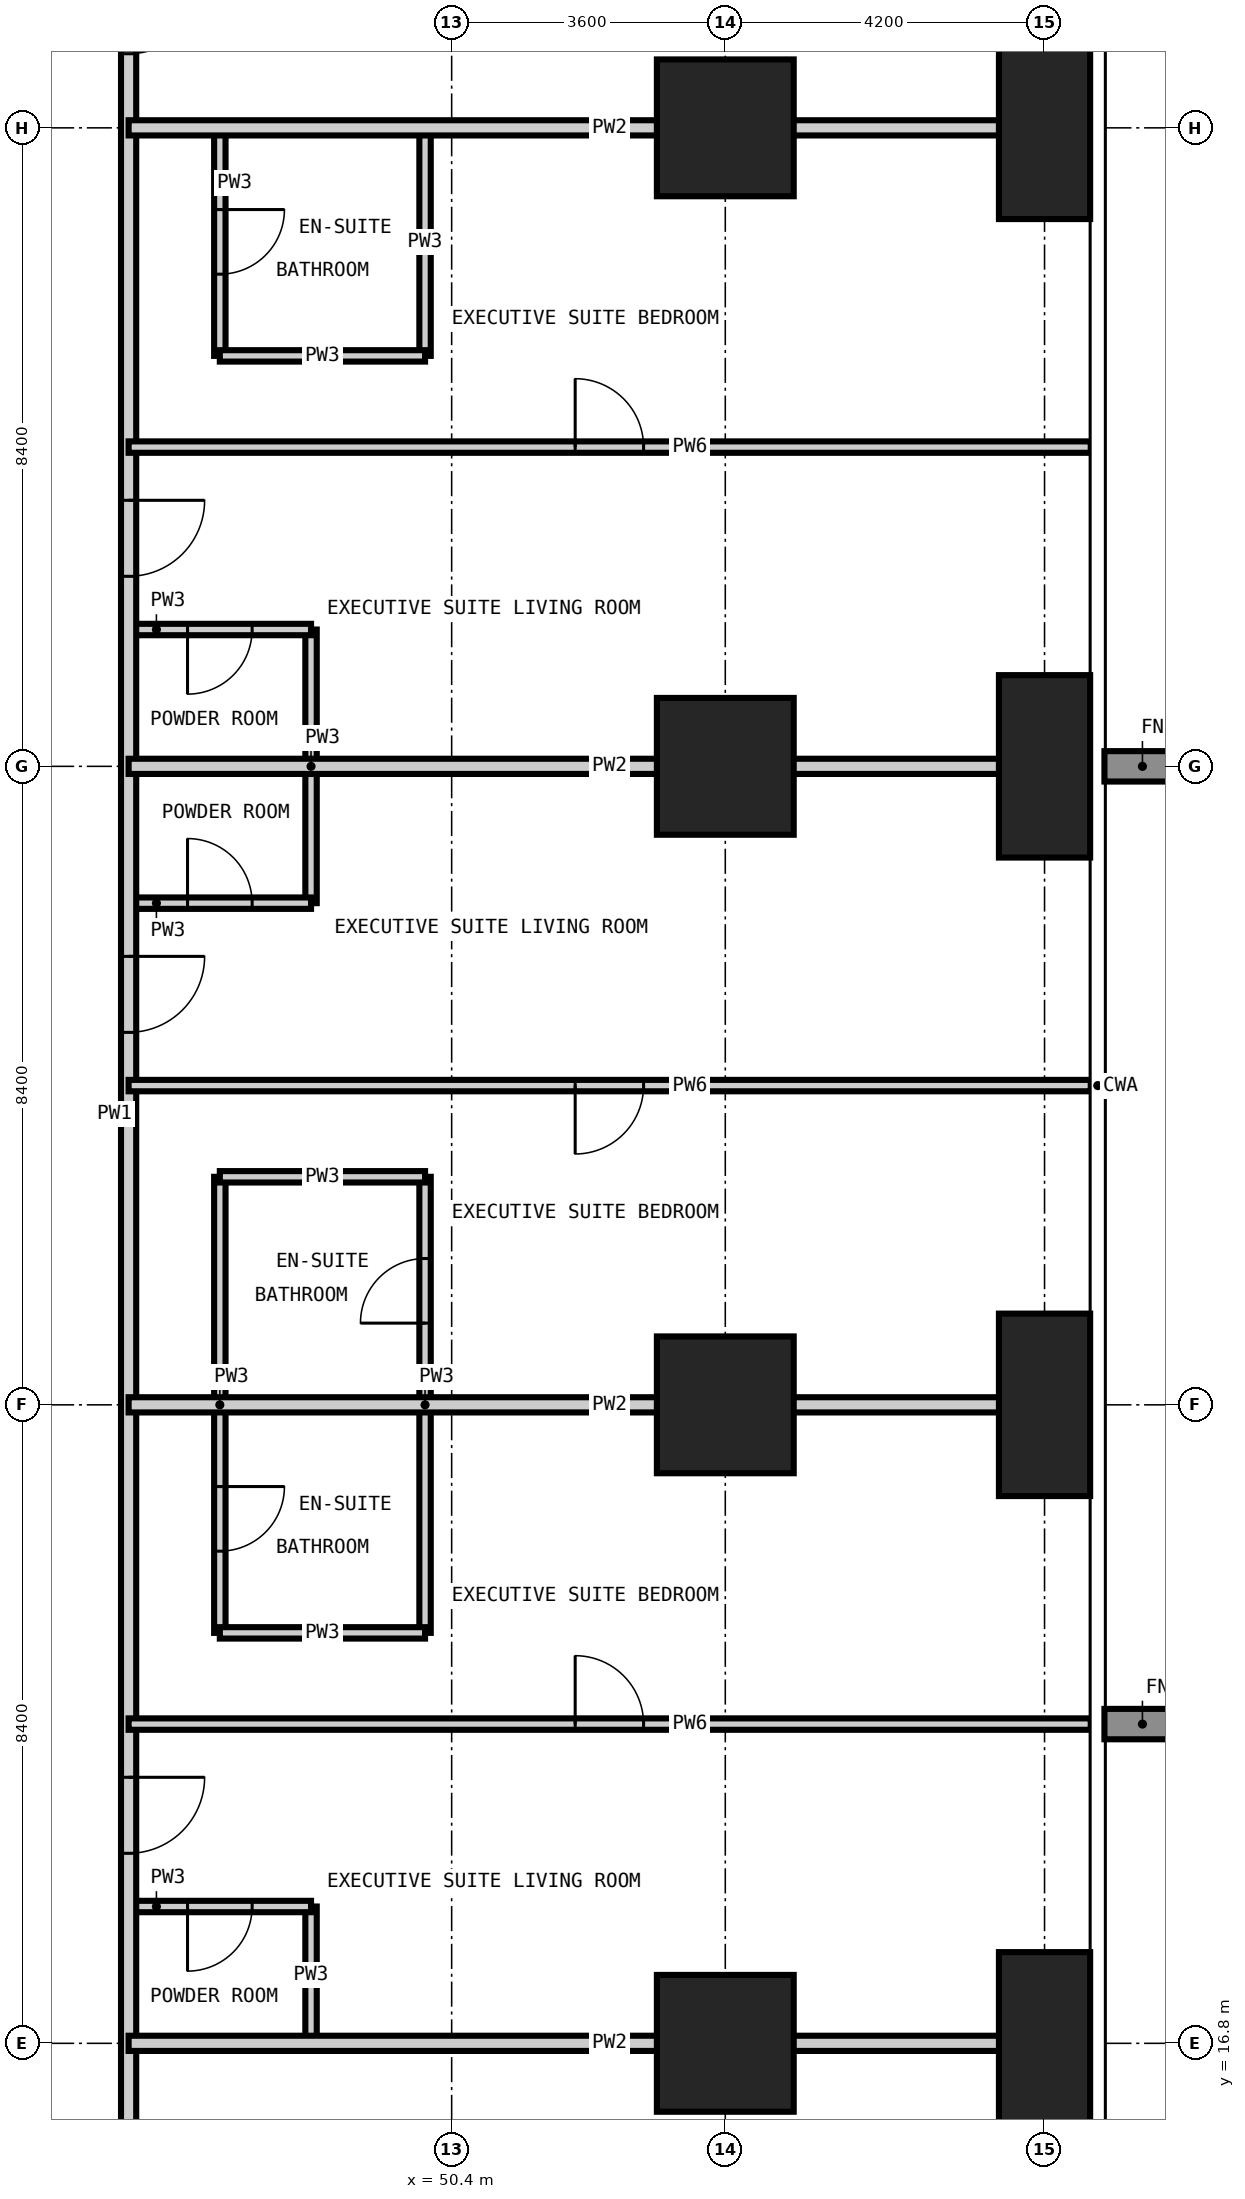
"""IFC4 building model, lengths in metres.
Left out: names, types, materials, properties, quantities, classifications, styles, units other than length and angle.
Written with IfcOpenShell. Run it as: python <this file> out.ifc"""

import sys

from ifc_helpers import new_model, si_unit, direction, frame, frame_2d, origin, origin_2d, place, context, subcontext, project, spatial, rectangle, extrude, element, fill, save


model = new_model("IFC4")
c1 = context("Model", 3, precision=1e-05, world=origin(), true_north=direction((0.0, 1.0)))
c2 = subcontext(c1, "Body", "Model", "MODEL_VIEW")
j1 = project(units=[si_unit("LENGTHUNIT", "METRE"), si_unit("PLANEANGLEUNIT", "RADIAN")], contexts=[c1])
p1 = place(None, origin())
s1 = spatial("IfcSite", under=j1, at=p1, CompositionType="ELEMENT")
p2 = place(p1, origin())
s2 = spatial("IfcBuilding", under=s1, at=p2, CompositionType="ELEMENT")
p3 = place(p2, frame((0.0, 0.0, 63.0)))
s3 = spatial("IfcBuildingStorey", under=s2, at=p3, CompositionType="ELEMENT", Elevation=63.0)
for number, where, z_axis, x_axis in (
    (1, (54.0, 16.8, -0.35), (0.0, 0.0, 1.0), (1.0, 0.0, 0.0)),
    (2, (54.0, 25.2, -0.35), (0.0, 0.0, 1.0), (1.0, 0.0, 0.0)),
    (3, (54.0, 33.6, -0.35), (0.0, 0.0, 1.0), (1.0, 0.0, 0.0)),
    (4, (54.0, 42.0, -0.35), (0.0, 0.0, 1.0), (1.0, 0.0, 0.0)),
):
    element("IfcColumn", number, at=place(p3, frame(where, z_axis=z_axis, x_axis=x_axis)), inside=s3, PredefinedType="COLUMN", context=c2, shape_type="SweptSolid", body=[
        extrude(rectangle(XDim=1.8, YDim=1.8, at=origin_2d()), origin(), (0.0, 0.0, 1.0), 3.6),
    ])
for number, where, z_axis, x_axis in (
    (5, (58.2, 16.8, -0.35), (0.0, 0.0, 1.0), (1.0, 0.0, 0.0)),
    (6, (58.2, 25.2, -0.35), (0.0, 0.0, 1.0), (1.0, 0.0, 0.0)),
    (7, (58.2, 33.6, -0.35), (0.0, 0.0, 1.0), (1.0, 0.0, 0.0)),
    (8, (58.2, 42.0, -0.35), (0.0, 0.0, 1.0), (1.0, 0.0, 0.0)),
):
    element("IfcColumn", number, at=place(p3, frame(where, z_axis=z_axis, x_axis=x_axis)), inside=s3, PredefinedType="COLUMN", context=c2, shape_type="SweptSolid", body=[
        extrude(rectangle(XDim=1.2, YDim=2.4, at=origin_2d()), origin(), (0.0, 0.0, 1.0), 3.6),
    ])
p4 = place(p3, frame((47.35, 22.2, 0.0), z_axis=(0.0, 0.0, 1.0), x_axis=(0.0, 1.0, 0.0)))
e9 = element("IfcWall", 9, at=p4, inside=s3, PredefinedType="PARTITIONING", context=c2, shape_type="SweptSolid", body=[
    extrude(rectangle(XDim=6.0, YDim=0.15, at=frame_2d((3.0, 0.0))), origin(), (0.0, 0.0, 1.0), 3.25),
])
p5 = place(p4, frame((1.075, 0.0, 0.0)))
e10 = element("IfcOpeningElement", 10, at=p5, cuts=e9, PredefinedType="OPENING", context=c2, shape_type="SweptSolid", body=[
    extrude(rectangle(XDim=0.85, YDim=2.1, at=frame_2d((0.425, 1.05))), frame((0.0, 0.085, 0.0), z_axis=(0.0, -1.0, 0.0), x_axis=(1.0, 0.0, 0.0)), (0.0, 0.0, 1.0), 0.17),
])
p6 = place(p3, frame((47.35, 39.0, 0.0), z_axis=(0.0, 0.0, 1.0), x_axis=(0.0, 1.0, 0.0)))
e11 = element("IfcWall", 11, at=p6, inside=s3, PredefinedType="PARTITIONING", context=c2, shape_type="SweptSolid", body=[
    extrude(rectangle(XDim=3.0, YDim=0.15, at=frame_2d((1.5, 0.0))), origin(), (0.0, 0.0, 1.0), 3.25),
])
p7 = place(p6, frame((1.075, 0.0, 0.0)))
e12 = element("IfcOpeningElement", 12, at=p7, cuts=e11, PredefinedType="OPENING", context=c2, shape_type="SweptSolid", body=[
    extrude(rectangle(XDim=0.85, YDim=2.1, at=frame_2d((0.425, 1.05))), frame((0.0, 0.085, 0.0), z_axis=(0.0, -1.0, 0.0), x_axis=(1.0, 0.0, 0.0)), (0.0, 0.0, 1.0), 0.17),
])
p8 = place(p3, frame((48.55, 16.8, 0.0), z_axis=(0.0, 0.0, 1.0), x_axis=(0.0, 1.0, 0.0)))
e13 = element("IfcWall", 13, at=p8, inside=s3, PredefinedType="PARTITIONING", context=c2, shape_type="SweptSolid", body=[
    extrude(rectangle(XDim=1.8, YDim=0.15, at=frame_2d((0.9, 0.0))), origin(), (0.0, 0.0, 1.0), 3.25),
])
p9 = place(p3, frame((48.55, 31.8, 0.0), z_axis=(0.0, 0.0, 1.0), x_axis=(0.0, 1.0, 0.0)))
e14 = element("IfcWall", 14, at=p9, inside=s3, PredefinedType="PARTITIONING", context=c2, shape_type="SweptSolid", body=[
    extrude(rectangle(XDim=3.6, YDim=0.15, at=frame_2d((1.8, 0.0))), origin(), (0.0, 0.0, 1.0), 3.25),
])
p10 = place(p3, frame((50.05, 22.2, 0.0), z_axis=(0.0, 0.0, 1.0), x_axis=(0.0, 1.0, 0.0)))
e15 = element("IfcWall", 15, at=p10, inside=s3, PredefinedType="PARTITIONING", context=c2, shape_type="SweptSolid", body=[
    extrude(rectangle(XDim=6.0, YDim=0.15, at=frame_2d((3.0, 0.0))), origin(), (0.0, 0.0, 1.0), 3.25),
])
p11 = place(p10, frame((4.075, 0.0, 0.0)))
e16 = element("IfcOpeningElement", 16, at=p11, cuts=e15, PredefinedType="OPENING", context=c2, shape_type="SweptSolid", body=[
    extrude(rectangle(XDim=0.85, YDim=2.1, at=frame_2d((0.425, 1.05))), frame((0.0, 0.085, 0.0), z_axis=(0.0, -1.0, 0.0), x_axis=(1.0, 0.0, 0.0)), (0.0, 0.0, 1.0), 0.17),
])
p12 = place(p3, frame((50.05, 39.0, 0.0), z_axis=(0.0, 0.0, 1.0), x_axis=(0.0, 1.0, 0.0)))
e17 = element("IfcWall", 17, at=p12, inside=s3, PredefinedType="PARTITIONING", context=c2, shape_type="SweptSolid", body=[
    extrude(rectangle(XDim=3.0, YDim=0.15, at=frame_2d((1.5, 0.0))), origin(), (0.0, 0.0, 1.0), 3.25),
])
p13 = place(p3, frame((46.15, 18.6, 0.0), z_axis=(0.0, 0.0, 1.0), x_axis=(1.0, 0.0, 0.0)))
e18 = element("IfcWall", 18, at=p13, inside=s3, PredefinedType="PARTITIONING", context=c2, shape_type="SweptSolid", body=[
    extrude(rectangle(XDim=2.4, YDim=0.15, at=frame_2d((1.2, 0.0))), origin(), (0.0, 0.0, 1.0), 3.25),
])
p14 = place(p13, frame((0.775, 0.0, 0.0)))
e19 = element("IfcOpeningElement", 19, at=p14, cuts=e18, PredefinedType="OPENING", context=c2, shape_type="SweptSolid", body=[
    extrude(rectangle(XDim=0.85, YDim=2.1, at=frame_2d((0.425, 1.05))), frame((0.0, 0.085, 0.0), z_axis=(0.0, -1.0, 0.0), x_axis=(1.0, 0.0, 0.0)), (0.0, 0.0, 1.0), 0.17),
])
for number, where, z_axis, x_axis in (
    (20, (47.35, 22.2, 0.0), (0.0, 0.0, 1.0), (1.0, 0.0, 0.0)),
    (21, (47.35, 28.2, 0.0), (0.0, 0.0, 1.0), (1.0, 0.0, 0.0)),
):
    element("IfcWall", number, at=place(p3, frame(where, z_axis=z_axis, x_axis=x_axis)), inside=s3, PredefinedType="PARTITIONING", context=c2, shape_type="SweptSolid", body=[
        extrude(rectangle(XDim=2.7, YDim=0.15, at=frame_2d((1.35, 0.0))), origin(), (0.0, 0.0, 1.0), 3.25),
    ])
p15 = place(p3, frame((46.15, 31.8, 0.0), z_axis=(0.0, 0.0, 1.0), x_axis=(1.0, 0.0, 0.0)))
e22 = element("IfcWall", 22, at=p15, inside=s3, PredefinedType="PARTITIONING", context=c2, shape_type="SweptSolid", body=[
    extrude(rectangle(XDim=2.4, YDim=0.15, at=frame_2d((1.2, 0.0))), origin(), (0.0, 0.0, 1.0), 3.25),
])
p16 = place(p15, frame((0.775, 0.0, 0.0)))
e23 = element("IfcOpeningElement", 23, at=p16, cuts=e22, PredefinedType="OPENING", context=c2, shape_type="SweptSolid", body=[
    extrude(rectangle(XDim=0.85, YDim=2.1, at=frame_2d((0.425, 1.05))), frame((0.0, 0.085, 0.0), z_axis=(0.0, -1.0, 0.0), x_axis=(1.0, 0.0, 0.0)), (0.0, 0.0, 1.0), 0.17),
])
p17 = place(p3, frame((46.15, 35.4, 0.0), z_axis=(0.0, 0.0, 1.0), x_axis=(1.0, 0.0, 0.0)))
e24 = element("IfcWall", 24, at=p17, inside=s3, PredefinedType="PARTITIONING", context=c2, shape_type="SweptSolid", body=[
    extrude(rectangle(XDim=2.4, YDim=0.15, at=frame_2d((1.2, 0.0))), origin(), (0.0, 0.0, 1.0), 3.25),
])
p18 = place(p17, frame((0.775, 0.0, 0.0)))
e25 = element("IfcOpeningElement", 25, at=p18, cuts=e24, PredefinedType="OPENING", context=c2, shape_type="SweptSolid", body=[
    extrude(rectangle(XDim=0.85, YDim=2.1, at=frame_2d((0.425, 1.05))), frame((0.0, 0.085, 0.0), z_axis=(0.0, -1.0, 0.0), x_axis=(1.0, 0.0, 0.0)), (0.0, 0.0, 1.0), 0.17),
])
p19 = place(p3, frame((47.35, 39.0, 0.0), z_axis=(0.0, 0.0, 1.0), x_axis=(1.0, 0.0, 0.0)))
e26 = element("IfcWall", 26, at=p19, inside=s3, PredefinedType="PARTITIONING", context=c2, shape_type="SweptSolid", body=[
    extrude(rectangle(XDim=2.7, YDim=0.15, at=frame_2d((1.35, 0.0))), origin(), (0.0, 0.0, 1.0), 3.25),
])
p20 = place(p3, frame((46.15, 44.95, 0.0), z_axis=(0.0, 0.0, 1.0), x_axis=(0.0, -1.0, 0.0)))
e27 = element("IfcWall", 27, at=p20, inside=s3, PredefinedType="PARTITIONING", context=c2, shape_type="SweptSolid", body=[
    extrude(rectangle(XDim=31.7, YDim=0.2, at=frame_2d((15.85, 0.0))), origin(), (0.0, 0.0, 1.0), 3.25),
])
p21 = place(p20, frame((24.65, 0.0, 0.0)))
e28 = element("IfcOpeningElement", 28, at=p21, cuts=e27, PredefinedType="OPENING", context=c2, shape_type="SweptSolid", body=[
    extrude(rectangle(XDim=1.0, YDim=2.2, at=frame_2d((0.5, 1.1))), frame((0.0, 0.11, 0.0), z_axis=(0.0, -1.0, 0.0), x_axis=(1.0, 0.0, 0.0)), (0.0, 0.0, 1.0), 0.22),
])
p22 = place(p20, frame((13.85, 0.0, 0.0)))
e29 = element("IfcOpeningElement", 29, at=p22, cuts=e27, PredefinedType="OPENING", context=c2, shape_type="SweptSolid", body=[
    extrude(rectangle(XDim=1.0, YDim=2.2, at=frame_2d((0.5, 1.1))), frame((0.0, 0.11, 0.0), z_axis=(0.0, -1.0, 0.0), x_axis=(1.0, 0.0, 0.0)), (0.0, 0.0, 1.0), 0.22),
])
p23 = place(p20, frame((7.85, 0.0, 0.0)))
e30 = element("IfcOpeningElement", 30, at=p23, cuts=e27, PredefinedType="OPENING", context=c2, shape_type="SweptSolid", body=[
    extrude(rectangle(XDim=1.0, YDim=2.2, at=frame_2d((0.5, 1.1))), frame((0.0, 0.11, 0.0), z_axis=(0.0, -1.0, 0.0), x_axis=(1.0, 0.0, 0.0)), (0.0, 0.0, 1.0), 0.22),
])
p24 = place(p20, frame((29.425, 0.0, 0.0)))
e31 = element("IfcOpeningElement", 31, at=p24, cuts=e27, PredefinedType="OPENING", context=c2, shape_type="SweptSolid", body=[
    extrude(rectangle(XDim=1.0, YDim=2.2, at=frame_2d((0.5, 1.1))), frame((0.0, 0.11, 0.0), z_axis=(0.0, -1.0, 0.0), x_axis=(1.0, 0.0, 0.0)), (0.0, 0.0, 1.0), 0.22),
])
p25 = place(p20, frame((0.975, 0.0, 0.0)))
e32 = element("IfcOpeningElement", 32, at=p25, cuts=e27, PredefinedType="OPENING", context=c2, shape_type="SweptSolid", body=[
    extrude(rectangle(XDim=1.0, YDim=2.2, at=frame_2d((0.5, 1.1))), frame((0.0, 0.11, 0.0), z_axis=(0.0, -1.0, 0.0), x_axis=(1.0, 0.0, 0.0)), (0.0, 0.0, 1.0), 0.22),
])
for number, where, z_axis, x_axis in (
    (33, (46.15, 16.8, 0.0), (0.0, 0.0, 1.0), (1.0, 0.0, 0.0)),
    (34, (46.15, 25.2, 0.0), (0.0, 0.0, 1.0), (1.0, 0.0, 0.0)),
    (35, (46.15, 33.6, 0.0), (0.0, 0.0, 1.0), (1.0, 0.0, 0.0)),
    (36, (46.15, 42.0, 0.0), (0.0, 0.0, 1.0), (1.0, 0.0, 0.0)),
):
    element("IfcWall", number, at=place(p3, frame(where, z_axis=z_axis, x_axis=x_axis)), inside=s3, PredefinedType="PARTITIONING", context=c2, shape_type="SweptSolid", body=[
        extrude(rectangle(XDim=12.658, YDim=0.2, at=frame_2d((6.329, 0.0))), origin(), (0.0, 0.0, 1.0), 3.25),
    ])
p26 = place(p3, frame((46.15, 21.0, 0.0), z_axis=(0.0, 0.0, 1.0), x_axis=(1.0, 0.0, 0.0)))
e37 = element("IfcWall", 37, at=p26, inside=s3, PredefinedType="PARTITIONING", context=c2, shape_type="SweptSolid", body=[
    extrude(rectangle(XDim=12.658, YDim=0.15, at=frame_2d((6.329, 0.0))), origin(), (0.0, 0.0, 1.0), 3.25),
])
p27 = place(p26, frame((5.875, 0.0, 0.0)))
e38 = element("IfcOpeningElement", 38, at=p27, cuts=e37, PredefinedType="OPENING", context=c2, shape_type="SweptSolid", body=[
    extrude(rectangle(XDim=0.9, YDim=2.1, at=frame_2d((0.45, 1.05))), frame((0.0, 0.085, 0.0), z_axis=(0.0, -1.0, 0.0), x_axis=(1.0, 0.0, 0.0)), (0.0, 0.0, 1.0), 0.17),
])
p28 = place(p3, frame((46.15, 29.4, 0.0), z_axis=(0.0, 0.0, 1.0), x_axis=(1.0, 0.0, 0.0)))
e39 = element("IfcWall", 39, at=p28, inside=s3, PredefinedType="PARTITIONING", context=c2, shape_type="SweptSolid", body=[
    extrude(rectangle(XDim=12.658, YDim=0.15, at=frame_2d((6.329, 0.0))), origin(), (0.0, 0.0, 1.0), 3.25),
])
p29 = place(p28, frame((5.875, 0.0, 0.0)))
e40 = element("IfcOpeningElement", 40, at=p29, cuts=e39, PredefinedType="OPENING", context=c2, shape_type="SweptSolid", body=[
    extrude(rectangle(XDim=0.9, YDim=2.1, at=frame_2d((0.45, 1.05))), frame((0.0, 0.085, 0.0), z_axis=(0.0, -1.0, 0.0), x_axis=(1.0, 0.0, 0.0)), (0.0, 0.0, 1.0), 0.17),
])
p30 = place(p3, frame((46.15, 37.8, 0.0), z_axis=(0.0, 0.0, 1.0), x_axis=(1.0, 0.0, 0.0)))
e41 = element("IfcWall", 41, at=p30, inside=s3, PredefinedType="PARTITIONING", context=c2, shape_type="SweptSolid", body=[
    extrude(rectangle(XDim=12.658, YDim=0.15, at=frame_2d((6.329, 0.0))), origin(), (0.0, 0.0, 1.0), 3.25),
])
p31 = place(p30, frame((5.875, 0.0, 0.0)))
e42 = element("IfcOpeningElement", 42, at=p31, cuts=e41, PredefinedType="OPENING", context=c2, shape_type="SweptSolid", body=[
    extrude(rectangle(XDim=0.9, YDim=2.1, at=frame_2d((0.45, 1.05))), frame((0.0, 0.085, 0.0), z_axis=(0.0, -1.0, 0.0), x_axis=(1.0, 0.0, 0.0)), (0.0, 0.0, 1.0), 0.17),
])
p32 = place(p21, origin())
e43 = element("IfcDoor", 43, at=p32, inside=s3, OperationType="SINGLE_SWING_LEFT", PredefinedType="DOOR", context=c2, shape_type="SweptSolid", body=[
    extrude(rectangle(XDim=1.0, YDim=2.2, at=frame_2d((0.5, 1.1))), frame((0.0, 0.025, 0.0), z_axis=(0.0, -1.0, 0.0), x_axis=(1.0, 0.0, 0.0)), (0.0, 0.0, 1.0), 0.05),
])
fill(e28, e43)
p33 = place(p14, frame((0.85, 0.0, 0.0), z_axis=(0.0, 0.0, 1.0), x_axis=(-1.0, 0.0, 0.0)))
e44 = element("IfcDoor", 44, at=p33, inside=s3, OperationType="SINGLE_SWING_RIGHT", PredefinedType="DOOR", context=c2, shape_type="SweptSolid", body=[
    extrude(rectangle(XDim=0.85, YDim=2.1, at=frame_2d((0.425, 1.05))), frame((0.0, 0.025, 0.0), z_axis=(0.0, -1.0, 0.0), x_axis=(1.0, 0.0, 0.0)), (0.0, 0.0, 1.0), 0.05),
])
fill(e19, e44)
p34 = place(p27, origin())
e45 = element("IfcDoor", 45, at=p34, inside=s3, OperationType="SINGLE_SWING_LEFT", PredefinedType="DOOR", context=c2, shape_type="SweptSolid", body=[
    extrude(rectangle(XDim=0.9, YDim=2.1, at=frame_2d((0.45, 1.05))), frame((0.0, 0.025, 0.0), z_axis=(0.0, -1.0, 0.0), x_axis=(1.0, 0.0, 0.0)), (0.0, 0.0, 1.0), 0.05),
])
fill(e38, e45)
p35 = place(p5, frame((0.85, 0.0, 0.0), z_axis=(0.0, 0.0, 1.0), x_axis=(-1.0, 0.0, 0.0)))
e46 = element("IfcDoor", 46, at=p35, inside=s3, OperationType="SINGLE_SWING_LEFT", PredefinedType="DOOR", context=c2, shape_type="SweptSolid", body=[
    extrude(rectangle(XDim=0.85, YDim=2.1, at=frame_2d((0.425, 1.05))), frame((0.0, 0.025, 0.0), z_axis=(0.0, -1.0, 0.0), x_axis=(1.0, 0.0, 0.0)), (0.0, 0.0, 1.0), 0.05),
])
fill(e10, e46)
p36 = place(p22, origin())
e47 = element("IfcDoor", 47, at=p36, inside=s3, OperationType="SINGLE_SWING_LEFT", PredefinedType="DOOR", context=c2, shape_type="SweptSolid", body=[
    extrude(rectangle(XDim=1.0, YDim=2.2, at=frame_2d((0.5, 1.1))), frame((0.0, 0.025, 0.0), z_axis=(0.0, -1.0, 0.0), x_axis=(1.0, 0.0, 0.0)), (0.0, 0.0, 1.0), 0.05),
])
fill(e29, e47)
p37 = place(p16, origin())
e48 = element("IfcDoor", 48, at=p37, inside=s3, OperationType="SINGLE_SWING_LEFT", PredefinedType="DOOR", context=c2, shape_type="SweptSolid", body=[
    extrude(rectangle(XDim=0.85, YDim=2.1, at=frame_2d((0.425, 1.05))), frame((0.0, 0.025, 0.0), z_axis=(0.0, -1.0, 0.0), x_axis=(1.0, 0.0, 0.0)), (0.0, 0.0, 1.0), 0.05),
])
fill(e23, e48)
p38 = place(p29, frame((0.9, 0.0, 0.0), z_axis=(0.0, 0.0, 1.0), x_axis=(-1.0, 0.0, 0.0)))
e49 = element("IfcDoor", 49, at=p38, inside=s3, OperationType="SINGLE_SWING_RIGHT", PredefinedType="DOOR", context=c2, shape_type="SweptSolid", body=[
    extrude(rectangle(XDim=0.9, YDim=2.1, at=frame_2d((0.45, 1.05))), frame((0.0, 0.025, 0.0), z_axis=(0.0, -1.0, 0.0), x_axis=(1.0, 0.0, 0.0)), (0.0, 0.0, 1.0), 0.05),
])
fill(e40, e49)
p39 = place(p11, origin())
e50 = element("IfcDoor", 50, at=p39, inside=s3, OperationType="SINGLE_SWING_LEFT", PredefinedType="DOOR", context=c2, shape_type="SweptSolid", body=[
    extrude(rectangle(XDim=0.85, YDim=2.1, at=frame_2d((0.425, 1.05))), frame((0.0, 0.025, 0.0), z_axis=(0.0, -1.0, 0.0), x_axis=(1.0, 0.0, 0.0)), (0.0, 0.0, 1.0), 0.05),
])
fill(e16, e50)
p40 = place(p23, origin())
e51 = element("IfcDoor", 51, at=p40, inside=s3, OperationType="SINGLE_SWING_LEFT", PredefinedType="DOOR", context=c2, shape_type="SweptSolid", body=[
    extrude(rectangle(XDim=1.0, YDim=2.2, at=frame_2d((0.5, 1.1))), frame((0.0, 0.025, 0.0), z_axis=(0.0, -1.0, 0.0), x_axis=(1.0, 0.0, 0.0)), (0.0, 0.0, 1.0), 0.05),
])
fill(e30, e51)
p41 = place(p18, frame((0.85, 0.0, 0.0), z_axis=(0.0, 0.0, 1.0), x_axis=(-1.0, 0.0, 0.0)))
e52 = element("IfcDoor", 52, at=p41, inside=s3, OperationType="SINGLE_SWING_RIGHT", PredefinedType="DOOR", context=c2, shape_type="SweptSolid", body=[
    extrude(rectangle(XDim=0.85, YDim=2.1, at=frame_2d((0.425, 1.05))), frame((0.0, 0.025, 0.0), z_axis=(0.0, -1.0, 0.0), x_axis=(1.0, 0.0, 0.0)), (0.0, 0.0, 1.0), 0.05),
])
fill(e25, e52)
p42 = place(p31, origin())
e53 = element("IfcDoor", 53, at=p42, inside=s3, OperationType="SINGLE_SWING_LEFT", PredefinedType="DOOR", context=c2, shape_type="SweptSolid", body=[
    extrude(rectangle(XDim=0.9, YDim=2.1, at=frame_2d((0.45, 1.05))), frame((0.0, 0.025, 0.0), z_axis=(0.0, -1.0, 0.0), x_axis=(1.0, 0.0, 0.0)), (0.0, 0.0, 1.0), 0.05),
])
fill(e42, e53)
p43 = place(p7, frame((0.85, 0.0, 0.0), z_axis=(0.0, 0.0, 1.0), x_axis=(-1.0, 0.0, 0.0)))
e54 = element("IfcDoor", 54, at=p43, inside=s3, OperationType="SINGLE_SWING_LEFT", PredefinedType="DOOR", context=c2, shape_type="SweptSolid", body=[
    extrude(rectangle(XDim=0.85, YDim=2.1, at=frame_2d((0.425, 1.05))), frame((0.0, 0.025, 0.0), z_axis=(0.0, -1.0, 0.0), x_axis=(1.0, 0.0, 0.0)), (0.0, 0.0, 1.0), 0.05),
])
fill(e12, e54)
p44 = place(p25, origin())
e55 = element("IfcDoor", 55, at=p44, inside=s3, OperationType="SINGLE_SWING_LEFT", PredefinedType="DOOR", context=c2, shape_type="SweptSolid", body=[
    extrude(rectangle(XDim=1.0, YDim=2.2, at=frame_2d((0.5, 1.1))), frame((0.0, 0.025, 0.0), z_axis=(0.0, -1.0, 0.0), x_axis=(1.0, 0.0, 0.0)), (0.0, 0.0, 1.0), 0.05),
])
fill(e32, e55)
save(model, sys.argv[1])
